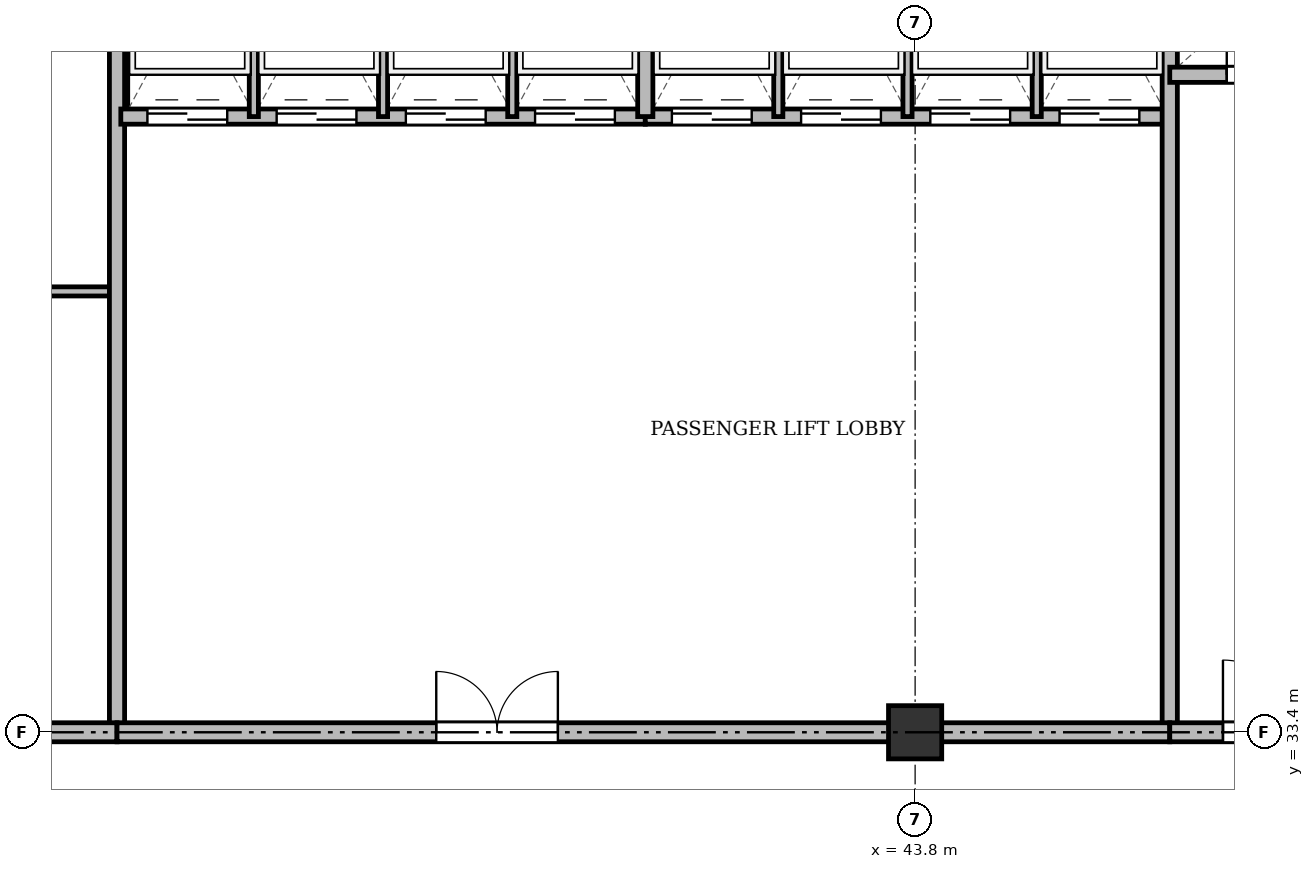
"""IFC4 building model, lengths in metres.
Left out: names, types, materials, properties, quantities, classifications, styles, units other than length and angle.
Written with IfcOpenShell. Run it as: python <this file> out.ifc"""

import sys

from ifc_helpers import new_model, si_unit, direction, frame, frame_2d, origin, origin_2d, place, context, subcontext, project, spatial, rectangle, extrude, source, transform, mapped, element, fill, save


model = new_model("IFC4")
c1 = context("Model", 3, precision=1e-05, world=origin(), true_north=direction((0.0, 1.0)))
c2 = subcontext(c1, "Body", "Model", "MODEL_VIEW")
j1 = project(units=[si_unit("LENGTHUNIT", "METRE"), si_unit("PLANEANGLEUNIT", "RADIAN")], contexts=[c1])
p1 = place(None, origin())
s1 = spatial("IfcSite", under=j1, at=p1, CompositionType="ELEMENT")
p2 = place(p1, origin())
s2 = spatial("IfcBuilding", under=s1, at=p2, CompositionType="ELEMENT")
p3 = place(p2, frame((0.0, 0.0, 215.7)))
s3 = spatial("IfcBuildingStorey", under=s2, at=p3, CompositionType="ELEMENT", Elevation=215.7)
m1 = source(origin(), c2, "Body", "SweptSolid", [
    extrude(rectangle(XDim=0.7, YDim=0.7, at=origin_2d()), origin(), (0.0, 0.0, 1.0), 3.6),
])
p4 = place(p3, frame((43.8, 33.4, 0.0), z_axis=(0.0, 0.0, 1.0), x_axis=(1.0, 0.0, 0.0)))
e1 = element("IfcColumn", 1, at=p4, inside=s3, PredefinedType="COLUMN", context=c2, shape_type="MappedRepresentation", body=[
    mapped(m1, transform((0.0, 0.0, 0.0), x_axis=(1.0, 0.0, 0.0), y_axis=(0.0, 1.0, 0.0), z_axis=(0.0, 0.0, 1.0), scale=1.0)),
])
p5 = place(p3, frame((26.3, 39.2, 0.0), z_axis=(0.0, 0.0, 1.0), x_axis=(1.0, 0.0, 0.0)))
e2 = element("IfcWall", 2, at=p5, inside=s3, PredefinedType="PARTITIONING", context=c2, shape_type="SweptSolid", body=[
    extrude(rectangle(XDim=7.0, YDim=0.12, at=frame_2d((3.5, 0.0))), origin(), (0.0, 0.0, 1.0), 2.86),
])
p6 = place(p5, frame((2.6, 0.0, 0.0)))
e3 = element("IfcOpeningElement", 3, at=p6, cuts=e2, PredefinedType="OPENING", context=c2, shape_type="SweptSolid", body=[
    extrude(rectangle(XDim=0.95, YDim=2.15, at=frame_2d((0.475, 1.075))), frame((0.0, 0.07, 0.0), z_axis=(0.0, -1.0, 0.0), x_axis=(1.0, 0.0, 0.0)), (0.0, 0.0, 1.0), 0.14),
])
p7 = place(p3, frame((33.3, 33.4, 0.0), z_axis=(0.0, 0.0, 1.0), x_axis=(0.0, 1.0, 0.0)))
e4 = element("IfcWall", 4, at=p7, inside=s3, PredefinedType="SOLIDWALL", context=c2, shape_type="SweptSolid", body=[
    extrude(rectangle(XDim=11.3, YDim=0.2, at=frame_2d((5.65, 0.0))), origin(), (0.0, 0.0, 1.0), 2.91),
])
p8 = place(p3, frame((33.35, 41.5, 0.0), z_axis=(0.0, 0.0, 1.0), x_axis=(1.0, 0.0, 0.0)))
e5 = element("IfcWall", 5, at=p8, inside=s3, PredefinedType="SOLIDWALL", context=c2, shape_type="SweptSolid", body=[
    extrude(rectangle(XDim=6.9, YDim=0.2, at=frame_2d((3.45, 0.0))), origin(), (0.0, 0.0, 1.0), 3.36),
])
p9 = place(p8, frame((0.35, 0.0, 0.0)))
e6 = element("IfcOpeningElement", 6, at=p9, cuts=e5, PredefinedType="OPENING", context=c2, shape_type="SweptSolid", body=[
    extrude(rectangle(XDim=1.05, YDim=2.15, at=frame_2d((0.525, 1.075))), frame((0.0, 0.11, 0.0), z_axis=(0.0, -1.0, 0.0), x_axis=(1.0, 0.0, 0.0)), (0.0, 0.0, 1.0), 0.22),
])
p10 = place(p8, frame((2.05, 0.0, 0.0)))
e7 = element("IfcOpeningElement", 7, at=p10, cuts=e5, PredefinedType="OPENING", context=c2, shape_type="SweptSolid", body=[
    extrude(rectangle(XDim=1.05, YDim=2.15, at=frame_2d((0.525, 1.075))), frame((0.0, 0.11, 0.0), z_axis=(0.0, -1.0, 0.0), x_axis=(1.0, 0.0, 0.0)), (0.0, 0.0, 1.0), 0.22),
])
p11 = place(p8, frame((3.75, 0.0, 0.0)))
e8 = element("IfcOpeningElement", 8, at=p11, cuts=e5, PredefinedType="OPENING", context=c2, shape_type="SweptSolid", body=[
    extrude(rectangle(XDim=1.05, YDim=2.15, at=frame_2d((0.525, 1.075))), frame((0.0, 0.11, 0.0), z_axis=(0.0, -1.0, 0.0), x_axis=(1.0, 0.0, 0.0)), (0.0, 0.0, 1.0), 0.22),
])
p12 = place(p8, frame((5.45, 0.0, 0.0)))
e9 = element("IfcOpeningElement", 9, at=p12, cuts=e5, PredefinedType="OPENING", context=c2, shape_type="SweptSolid", body=[
    extrude(rectangle(XDim=1.05, YDim=2.15, at=frame_2d((0.525, 1.075))), frame((0.0, 0.11, 0.0), z_axis=(0.0, -1.0, 0.0), x_axis=(1.0, 0.0, 0.0)), (0.0, 0.0, 1.0), 0.22),
])
for number, where, z_axis, x_axis in (
    (10, (35.1, 41.5, 0.0), (0.0, 0.0, 1.0), (0.0, 1.0, 0.0)),
    (11, (36.8, 41.5, 0.0), (0.0, 0.0, 1.0), (0.0, 1.0, 0.0)),
    (12, (38.5, 41.5, 0.0), (0.0, 0.0, 1.0), (0.0, 1.0, 0.0)),
):
    element("IfcWall", number, at=place(p3, frame(where, z_axis=z_axis, x_axis=x_axis)), inside=s3, PredefinedType="PARTITIONING", context=c2, shape_type="SweptSolid", body=[
        extrude(rectangle(XDim=3.2, YDim=0.12, at=frame_2d((1.6, 0.0))), origin(), (0.0, 0.0, 1.0), 3.36),
    ])
p13 = place(p3, frame((40.25, 41.5, 0.0), z_axis=(0.0, 0.0, 1.0), x_axis=(1.0, 0.0, 0.0)))
e13 = element("IfcWall", 13, at=p13, inside=s3, PredefinedType="SOLIDWALL", context=c2, shape_type="SweptSolid", body=[
    extrude(rectangle(XDim=6.9, YDim=0.2, at=frame_2d((3.45, 0.0))), origin(), (0.0, 0.0, 1.0), 3.36),
])
p14 = place(p13, frame((0.35, 0.0, 0.0)))
e14 = element("IfcOpeningElement", 14, at=p14, cuts=e13, PredefinedType="OPENING", context=c2, shape_type="SweptSolid", body=[
    extrude(rectangle(XDim=1.05, YDim=2.15, at=frame_2d((0.525, 1.075))), frame((0.0, 0.11, 0.0), z_axis=(0.0, -1.0, 0.0), x_axis=(1.0, 0.0, 0.0)), (0.0, 0.0, 1.0), 0.22),
])
p15 = place(p13, frame((2.05, 0.0, 0.0)))
e15 = element("IfcOpeningElement", 15, at=p15, cuts=e13, PredefinedType="OPENING", context=c2, shape_type="SweptSolid", body=[
    extrude(rectangle(XDim=1.05, YDim=2.15, at=frame_2d((0.525, 1.075))), frame((0.0, 0.11, 0.0), z_axis=(0.0, -1.0, 0.0), x_axis=(1.0, 0.0, 0.0)), (0.0, 0.0, 1.0), 0.22),
])
p16 = place(p13, frame((3.75, 0.0, 0.0)))
e16 = element("IfcOpeningElement", 16, at=p16, cuts=e13, PredefinedType="OPENING", context=c2, shape_type="SweptSolid", body=[
    extrude(rectangle(XDim=1.05, YDim=2.15, at=frame_2d((0.525, 1.075))), frame((0.0, 0.11, 0.0), z_axis=(0.0, -1.0, 0.0), x_axis=(1.0, 0.0, 0.0)), (0.0, 0.0, 1.0), 0.22),
])
p17 = place(p13, frame((5.45, 0.0, 0.0)))
e17 = element("IfcOpeningElement", 17, at=p17, cuts=e13, PredefinedType="OPENING", context=c2, shape_type="SweptSolid", body=[
    extrude(rectangle(XDim=1.05, YDim=2.15, at=frame_2d((0.525, 1.075))), frame((0.0, 0.11, 0.0), z_axis=(0.0, -1.0, 0.0), x_axis=(1.0, 0.0, 0.0)), (0.0, 0.0, 1.0), 0.22),
])
p18 = place(p3, frame((40.25, 41.5, 0.0), z_axis=(0.0, 0.0, 1.0), x_axis=(0.0, 1.0, 0.0)))
e18 = element("IfcWall", 18, at=p18, inside=s3, PredefinedType="SOLIDWALL", context=c2, shape_type="SweptSolid", body=[
    extrude(rectangle(XDim=3.2, YDim=0.2, at=frame_2d((1.6, 0.0))), origin(), (0.0, 0.0, 1.0), 3.36),
])
for number, where, z_axis, x_axis in (
    (19, (42.0, 41.5, 0.0), (0.0, 0.0, 1.0), (0.0, 1.0, 0.0)),
    (20, (43.7, 41.5, 0.0), (0.0, 0.0, 1.0), (0.0, 1.0, 0.0)),
    (21, (45.4, 41.5, 0.0), (0.0, 0.0, 1.0), (0.0, 1.0, 0.0)),
):
    element("IfcWall", number, at=place(p3, frame(where, z_axis=z_axis, x_axis=x_axis)), inside=s3, PredefinedType="PARTITIONING", context=c2, shape_type="SweptSolid", body=[
        extrude(rectangle(XDim=3.2, YDim=0.12, at=frame_2d((1.6, 0.0))), origin(), (0.0, 0.0, 1.0), 3.36),
    ])
p19 = place(p3, frame((47.15, 33.4, 0.0), z_axis=(0.0, 0.0, 1.0), x_axis=(0.0, 1.0, 0.0)))
e22 = element("IfcWall", 22, at=p19, inside=s3, PredefinedType="SOLIDWALL", context=c2, shape_type="SweptSolid", body=[
    extrude(rectangle(XDim=11.3, YDim=0.2, at=frame_2d((5.65, 0.0))), origin(), (0.0, 0.0, 1.0), 2.91),
])
p20 = place(p3, frame((26.3, 33.4, 0.0), z_axis=(0.0, 0.0, 1.0), x_axis=(1.0, 0.0, 0.0)))
e23 = element("IfcWall", 23, at=p20, inside=s3, PredefinedType="PARTITIONING", context=c2, shape_type="SweptSolid", body=[
    extrude(rectangle(XDim=7.0, YDim=0.25, at=frame_2d((3.5, 0.0))), origin(), (0.0, 0.0, 1.0), 2.91),
])
p21 = place(p20, frame((1.35, 0.0, 0.0)))
e24 = element("IfcOpeningElement", 24, at=p21, cuts=e23, PredefinedType="OPENING", context=c2, shape_type="SweptSolid", body=[
    extrude(rectangle(XDim=0.95, YDim=2.15, at=frame_2d((0.475, 1.075))), frame((0.0, 0.135, 0.0), z_axis=(0.0, -1.0, 0.0), x_axis=(1.0, 0.0, 0.0)), (0.0, 0.0, 1.0), 0.27),
])
p22 = place(p3, frame((33.3, 33.4, 0.0), z_axis=(0.0, 0.0, 1.0), x_axis=(1.0, 0.0, 0.0)))
e25 = element("IfcWall", 25, at=p22, inside=s3, PredefinedType="PARTITIONING", context=c2, shape_type="SweptSolid", body=[
    extrude(rectangle(XDim=13.85, YDim=0.25, at=frame_2d((6.925, 0.0))), origin(), (0.0, 0.0, 1.0), 2.91),
])
p23 = place(p22, frame((4.2, 0.0, 0.0)))
e26 = element("IfcOpeningElement", 26, at=p23, cuts=e25, PredefinedType="OPENING", context=c2, shape_type="SweptSolid", body=[
    extrude(rectangle(XDim=1.6, YDim=2.2, at=frame_2d((0.8, 1.1))), frame((0.0, 0.135, 0.0), z_axis=(0.0, -1.0, 0.0), x_axis=(1.0, 0.0, 0.0)), (0.0, 0.0, 1.0), 0.27),
])
p24 = place(p3, frame((47.15, 42.05, 0.0), z_axis=(0.0, 0.0, 1.0), x_axis=(1.0, 0.0, 0.0)))
e27 = element("IfcWall", 27, at=p24, inside=s3, PredefinedType="SOLIDWALL", context=c2, shape_type="SweptSolid", body=[
    extrude(rectangle(XDim=7.85, YDim=0.2, at=frame_2d((3.925, 0.0))), origin(), (0.0, 0.0, 1.0), 2.86),
])
p25 = place(p24, frame((0.75, 0.0, 0.0)))
e28 = element("IfcOpeningElement", 28, at=p25, cuts=e27, PredefinedType="OPENING", context=c2, shape_type="SweptSolid", body=[
    extrude(rectangle(XDim=0.9, YDim=2.1, at=frame_2d((0.45, 1.05))), frame((0.0, 0.11, 0.0), z_axis=(0.0, -1.0, 0.0), x_axis=(1.0, 0.0, 0.0)), (0.0, 0.0, 1.0), 0.22),
])
p26 = place(p24, frame((3.85, 0.0, 0.0)))
e29 = element("IfcOpeningElement", 29, at=p26, cuts=e27, PredefinedType="OPENING", context=c2, shape_type="SweptSolid", body=[
    extrude(rectangle(XDim=0.9, YDim=2.1, at=frame_2d((0.45, 1.05))), frame((0.0, 0.11, 0.0), z_axis=(0.0, -1.0, 0.0), x_axis=(1.0, 0.0, 0.0)), (0.0, 0.0, 1.0), 0.22),
])
p27 = place(p3, frame((47.15, 33.4, 0.0), z_axis=(0.0, 0.0, 1.0), x_axis=(1.0, 0.0, 0.0)))
e30 = element("IfcWall", 30, at=p27, inside=s3, PredefinedType="PARTITIONING", context=c2, shape_type="SweptSolid", body=[
    extrude(rectangle(XDim=11.15, YDim=0.25, at=frame_2d((5.575, 0.0))), origin(), (0.0, 0.0, 1.0), 2.91),
])
p28 = place(p27, frame((0.7, 0.0, 0.0)))
e31 = element("IfcOpeningElement", 31, at=p28, cuts=e30, PredefinedType="OPENING", context=c2, shape_type="SweptSolid", body=[
    extrude(rectangle(XDim=0.95, YDim=2.15, at=frame_2d((0.475, 1.075))), frame((0.0, 0.135, 0.0), z_axis=(0.0, -1.0, 0.0), x_axis=(1.0, 0.0, 0.0)), (0.0, 0.0, 1.0), 0.27),
])
p29 = place(p27, frame((6.0, 0.0, 0.0)))
e32 = element("IfcOpeningElement", 32, at=p29, cuts=e30, PredefinedType="OPENING", context=c2, shape_type="SweptSolid", body=[
    extrude(rectangle(XDim=1.2, YDim=2.15, at=frame_2d((0.6, 1.075))), frame((0.0, 0.135, 0.0), z_axis=(0.0, -1.0, 0.0), x_axis=(1.0, 0.0, 0.0)), (0.0, 0.0, 1.0), 0.27),
])
m2 = source(origin(), c2, "Body", "SweptSolid", [
    extrude(rectangle(XDim=1.05, YDim=2.15, at=frame_2d((0.525, 1.075))), frame((0.0, 0.025, 0.0), z_axis=(0.0, -1.0, 0.0), x_axis=(1.0, 0.0, 0.0)), (0.0, 0.0, 1.0), 0.05),
])
p30 = place(p9, origin())
e33 = element("IfcDoor", 33, at=p30, inside=s3, OperationType="DOUBLE_DOOR_SLIDING", PredefinedType="DOOR", context=c2, shape_type="MappedRepresentation", body=[
    mapped(m2, transform((0.0, 0.0, 0.0), x_axis=(1.0, 0.0, 0.0), y_axis=(0.0, 1.0, 0.0), z_axis=(0.0, 0.0, 1.0), scale=1.0)),
])
fill(e6, e33)
p31 = place(p10, origin())
e34 = element("IfcDoor", 34, at=p31, inside=s3, OperationType="DOUBLE_DOOR_SLIDING", PredefinedType="DOOR", context=c2, shape_type="MappedRepresentation", body=[
    mapped(m2, transform((0.0, 0.0, 0.0), x_axis=(1.0, 0.0, 0.0), y_axis=(0.0, 1.0, 0.0), z_axis=(0.0, 0.0, 1.0), scale=1.0)),
])
fill(e7, e34)
p32 = place(p11, origin())
e35 = element("IfcDoor", 35, at=p32, inside=s3, OperationType="DOUBLE_DOOR_SLIDING", PredefinedType="DOOR", context=c2, shape_type="MappedRepresentation", body=[
    mapped(m2, transform((0.0, 0.0, 0.0), x_axis=(1.0, 0.0, 0.0), y_axis=(0.0, 1.0, 0.0), z_axis=(0.0, 0.0, 1.0), scale=1.0)),
])
fill(e8, e35)
p33 = place(p12, origin())
e36 = element("IfcDoor", 36, at=p33, inside=s3, OperationType="DOUBLE_DOOR_SLIDING", PredefinedType="DOOR", context=c2, shape_type="MappedRepresentation", body=[
    mapped(m2, transform((0.0, 0.0, 0.0), x_axis=(1.0, 0.0, 0.0), y_axis=(0.0, 1.0, 0.0), z_axis=(0.0, 0.0, 1.0), scale=1.0)),
])
fill(e9, e36)
p34 = place(p14, origin())
e37 = element("IfcDoor", 37, at=p34, inside=s3, OperationType="DOUBLE_DOOR_SLIDING", PredefinedType="DOOR", context=c2, shape_type="MappedRepresentation", body=[
    mapped(m2, transform((0.0, 0.0, 0.0), x_axis=(1.0, 0.0, 0.0), y_axis=(0.0, 1.0, 0.0), z_axis=(0.0, 0.0, 1.0), scale=1.0)),
])
fill(e14, e37)
p35 = place(p15, origin())
e38 = element("IfcDoor", 38, at=p35, inside=s3, OperationType="DOUBLE_DOOR_SLIDING", PredefinedType="DOOR", context=c2, shape_type="MappedRepresentation", body=[
    mapped(m2, transform((0.0, 0.0, 0.0), x_axis=(1.0, 0.0, 0.0), y_axis=(0.0, 1.0, 0.0), z_axis=(0.0, 0.0, 1.0), scale=1.0)),
])
fill(e15, e38)
p36 = place(p16, origin())
e39 = element("IfcDoor", 39, at=p36, inside=s3, OperationType="DOUBLE_DOOR_SLIDING", PredefinedType="DOOR", context=c2, shape_type="MappedRepresentation", body=[
    mapped(m2, transform((0.0, 0.0, 0.0), x_axis=(1.0, 0.0, 0.0), y_axis=(0.0, 1.0, 0.0), z_axis=(0.0, 0.0, 1.0), scale=1.0)),
])
fill(e16, e39)
p37 = place(p17, origin())
e40 = element("IfcDoor", 40, at=p37, inside=s3, OperationType="DOUBLE_DOOR_SLIDING", PredefinedType="DOOR", context=c2, shape_type="MappedRepresentation", body=[
    mapped(m2, transform((0.0, 0.0, 0.0), x_axis=(1.0, 0.0, 0.0), y_axis=(0.0, 1.0, 0.0), z_axis=(0.0, 0.0, 1.0), scale=1.0)),
])
fill(e17, e40)
m3 = source(origin(), c2, "Body", "SweptSolid", [
    extrude(rectangle(XDim=1.6, YDim=2.2, at=frame_2d((0.8, 1.1))), frame((0.0, 0.025, 0.0), z_axis=(0.0, -1.0, 0.0), x_axis=(1.0, 0.0, 0.0)), (0.0, 0.0, 1.0), 0.05),
])
p38 = place(p23, origin())
e41 = element("IfcDoor", 41, at=p38, inside=s3, OperationType="DOUBLE_DOOR_SINGLE_SWING", PredefinedType="DOOR", context=c2, shape_type="MappedRepresentation", body=[
    mapped(m3, transform((0.0, 0.0, 0.0), x_axis=(1.0, 0.0, 0.0), y_axis=(0.0, 1.0, 0.0), z_axis=(0.0, 0.0, 1.0), scale=1.0)),
])
fill(e26, e41)
m4 = source(origin(), c2, "Body", "SweptSolid", [
    extrude(rectangle(XDim=0.9, YDim=2.1, at=frame_2d((0.45, 1.05))), frame((0.0, 0.025, 0.0), z_axis=(0.0, -1.0, 0.0), x_axis=(1.0, 0.0, 0.0)), (0.0, 0.0, 1.0), 0.05),
])
p39 = place(p25, origin())
e42 = element("IfcDoor", 42, at=p39, inside=s3, OperationType="SINGLE_SWING_LEFT", PredefinedType="DOOR", context=c2, shape_type="MappedRepresentation", body=[
    mapped(m4, transform((0.0, 0.0, 0.0), x_axis=(1.0, 0.0, 0.0), y_axis=(0.0, 1.0, 0.0), z_axis=(0.0, 0.0, 1.0), scale=1.0)),
])
fill(e28, e42)
m5 = source(origin(), c2, "Body", "SweptSolid", [
    extrude(rectangle(XDim=0.95, YDim=2.15, at=frame_2d((0.475, 1.075))), frame((0.0, 0.025, 0.0), z_axis=(0.0, -1.0, 0.0), x_axis=(1.0, 0.0, 0.0)), (0.0, 0.0, 1.0), 0.05),
])
p40 = place(p28, origin())
e43 = element("IfcDoor", 43, at=p40, inside=s3, OperationType="SINGLE_SWING_LEFT", PredefinedType="DOOR", context=c2, shape_type="MappedRepresentation", body=[
    mapped(m5, transform((0.0, 0.0, 0.0), x_axis=(1.0, 0.0, 0.0), y_axis=(0.0, 1.0, 0.0), z_axis=(0.0, 0.0, 1.0), scale=1.0)),
])
fill(e31, e43)
save(model, sys.argv[1])
